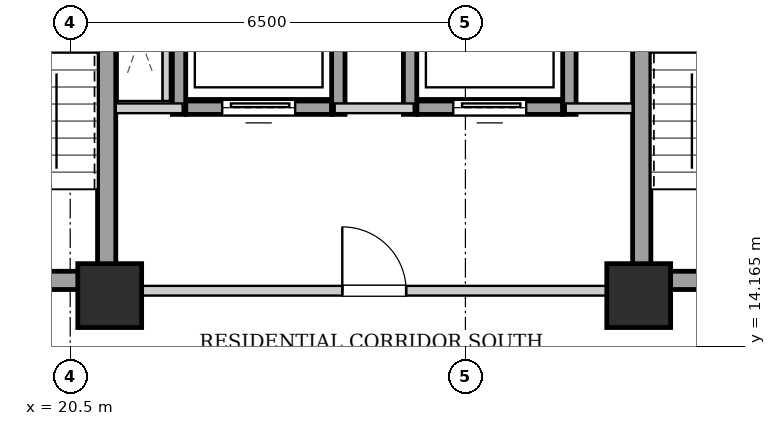
"""IFC4 building model, lengths in metres.
Left out: names, types, materials, properties, quantities, classifications, styles, units other than length and angle.
Written with IfcOpenShell. Run it as: python <this file> out.ifc"""

import sys

from ifc_helpers import new_model, si_unit, direction, frame, frame_2d, origin, origin_2d, place, context, subcontext, project, spatial, rectangle, extrude, element, fill, save


model = new_model("IFC4")
c1 = context("Model", 3, precision=1e-05, world=origin(), true_north=direction((0.0, 1.0)))
c2 = subcontext(c1, "Body", "Model", "MODEL_VIEW")
j1 = project(units=[si_unit("LENGTHUNIT", "METRE"), si_unit("PLANEANGLEUNIT", "RADIAN")], contexts=[c1])
p1 = place(None, origin())
s1 = spatial("IfcSite", under=j1, at=p1, CompositionType="ELEMENT")
p2 = place(p1, origin())
s2 = spatial("IfcBuilding", under=s1, at=p2, CompositionType="ELEMENT")
p3 = place(p2, frame((0.0, 0.0, 75.1)))
s3 = spatial("IfcBuildingStorey", under=s2, at=p3, CompositionType="ELEMENT", Elevation=75.1)
for number, where, z_axis, x_axis in (
    (1, (21.15, 15.0, 0.0), (0.0, 0.0, 1.0), (1.0, 0.0, 0.0)),
    (2, (29.85, 15.0, 0.0), (0.0, 0.0, 1.0), (1.0, 0.0, 0.0)),
):
    element("IfcColumn", number, at=place(p3, frame(where, z_axis=z_axis, x_axis=x_axis)), inside=s3, PredefinedType="COLUMN", context=c2, shape_type="SweptSolid", body=[
        extrude(rectangle(XDim=1.05, YDim=1.05, at=origin_2d()), origin(), (0.0, 0.0, 1.0), 3.2),
    ])
p4 = place(p3, frame((21.1, 15.1, 0.0), z_axis=(0.0, 0.0, 1.0), x_axis=(0.0, 1.0, 0.0)))
e3 = element("IfcWall", 3, at=p4, inside=s3, PredefinedType="SHEAR", context=c2, shape_type="SweptSolid", body=[
    extrude(rectangle(XDim=9.0, YDim=0.3, at=frame_2d((4.5, 0.0))), origin(), (0.0, 0.0, 1.0), 2.94),
])
p5 = place(p3, frame((18.1, 15.25, 0.0), z_axis=(0.0, 0.0, 1.0), x_axis=(1.0, 0.0, 0.0)))
e4 = element("IfcWall", 4, at=p5, inside=s3, PredefinedType="SHEAR", context=c2, shape_type="SweptSolid", body=[
    extrude(rectangle(XDim=2.85, YDim=0.3, at=frame_2d((1.425, 0.0))), origin(), (0.0, 0.0, 1.0), 2.94),
])
p6 = place(p5, frame((0.86, 0.0, 0.0)))
e5 = element("IfcOpeningElement", 5, at=p6, cuts=e4, PredefinedType="OPENING", context=c2, shape_type="SweptSolid", body=[
    extrude(rectangle(XDim=1.1, YDim=2.05, at=frame_2d((0.55, 1.025))), frame((0.0, 0.16, 0.0), z_axis=(0.0, -1.0, 0.0), x_axis=(1.0, 0.0, 0.0)), (0.0, 0.0, 1.0), 0.32),
])
p7 = place(p3, frame((29.9, 15.1, 0.0), z_axis=(0.0, 0.0, 1.0), x_axis=(0.0, 1.0, 0.0)))
e6 = element("IfcWall", 6, at=p7, inside=s3, PredefinedType="SHEAR", context=c2, shape_type="SweptSolid", body=[
    extrude(rectangle(XDim=9.0, YDim=0.3, at=frame_2d((4.5, 0.0))), origin(), (0.0, 0.0, 1.0), 2.94),
])
p8 = place(p3, frame((30.05, 15.25, 0.0), z_axis=(0.0, 0.0, 1.0), x_axis=(1.0, 0.0, 0.0)))
e7 = element("IfcWall", 7, at=p8, inside=s3, PredefinedType="SHEAR", context=c2, shape_type="SweptSolid", body=[
    extrude(rectangle(XDim=2.85, YDim=0.3, at=frame_2d((1.425, 0.0))), origin(), (0.0, 0.0, 1.0), 2.94),
])
p9 = place(p8, frame((0.86, 0.0, 0.0)))
e8 = element("IfcOpeningElement", 8, at=p9, cuts=e7, PredefinedType="OPENING", context=c2, shape_type="SweptSolid", body=[
    extrude(rectangle(XDim=1.1, YDim=2.05, at=frame_2d((0.55, 1.025))), frame((0.0, 0.16, 0.0), z_axis=(0.0, -1.0, 0.0), x_axis=(1.0, 0.0, 0.0)), (0.0, 0.0, 1.0), 0.32),
])
p10 = place(p3, frame((22.4, 18.09, 0.0), z_axis=(0.0, 0.0, 1.0), x_axis=(1.0, 0.0, 0.0)))
e9 = element("IfcWall", 9, at=p10, inside=s3, PredefinedType="SHEAR", context=c2, shape_type="SweptSolid", body=[
    extrude(rectangle(XDim=2.4, YDim=0.22, at=frame_2d((1.2, 0.0))), origin(), (0.0, 0.0, 1.0), 2.94),
])
p11 = place(p10, frame((0.6, 0.0, 0.0)))
e10 = element("IfcOpeningElement", 10, at=p11, cuts=e9, PredefinedType="OPENING", context=c2, shape_type="SweptSolid", body=[
    extrude(rectangle(XDim=1.2, YDim=2.15, at=frame_2d((0.6, 1.075))), frame((0.0, 0.12, 0.0), z_axis=(0.0, -1.0, 0.0), x_axis=(1.0, 0.0, 0.0)), (0.0, 0.0, 1.0), 0.24),
])
for number, where, z_axis, x_axis in (
    (11, (22.29, 17.98, 0.0), (0.0, 0.0, 1.0), (0.0, 1.0, 0.0)),
    (12, (24.91, 17.98, 0.0), (0.0, 0.0, 1.0), (0.0, 1.0, 0.0)),
):
    element("IfcWall", number, at=place(p3, frame(where, z_axis=z_axis, x_axis=x_axis)), inside=s3, PredefinedType="SHEAR", context=c2, shape_type="SweptSolid", body=[
        extrude(rectangle(XDim=2.54, YDim=0.22, at=frame_2d((1.27, 0.0))), origin(), (0.0, 0.0, 1.0), 2.94),
    ])
p12 = place(p3, frame((26.2, 18.09, 0.0), z_axis=(0.0, 0.0, 1.0), x_axis=(1.0, 0.0, 0.0)))
e13 = element("IfcWall", 13, at=p12, inside=s3, PredefinedType="SHEAR", context=c2, shape_type="SweptSolid", body=[
    extrude(rectangle(XDim=2.4, YDim=0.22, at=frame_2d((1.2, 0.0))), origin(), (0.0, 0.0, 1.0), 2.94),
])
p13 = place(p12, frame((0.6, 0.0, 0.0)))
e14 = element("IfcOpeningElement", 14, at=p13, cuts=e13, PredefinedType="OPENING", context=c2, shape_type="SweptSolid", body=[
    extrude(rectangle(XDim=1.2, YDim=2.15, at=frame_2d((0.6, 1.075))), frame((0.0, 0.12, 0.0), z_axis=(0.0, -1.0, 0.0), x_axis=(1.0, 0.0, 0.0)), (0.0, 0.0, 1.0), 0.24),
])
for number, where, z_axis, x_axis in (
    (15, (26.09, 17.98, 0.0), (0.0, 0.0, 1.0), (0.0, 1.0, 0.0)),
    (16, (28.71, 17.98, 0.0), (0.0, 0.0, 1.0), (0.0, 1.0, 0.0)),
):
    element("IfcWall", number, at=place(p3, frame(where, z_axis=z_axis, x_axis=x_axis)), inside=s3, PredefinedType="SHEAR", context=c2, shape_type="SweptSolid", body=[
        extrude(rectangle(XDim=2.54, YDim=0.22, at=frame_2d((1.27, 0.0))), origin(), (0.0, 0.0, 1.0), 2.94),
    ])
p14 = place(p3, frame((21.25, 15.08, 0.0), z_axis=(0.0, 0.0, 1.0), x_axis=(1.0, 0.0, 0.0)))
e17 = element("IfcWall", 17, at=p14, inside=s3, PredefinedType="PARTITIONING", context=c2, shape_type="SweptSolid", body=[
    extrude(rectangle(XDim=8.5, YDim=0.16, at=frame_2d((4.25, 0.0))), origin(), (0.0, 0.0, 1.0), 2.309),
])
p15 = place(p14, frame((3.725, 0.0, 0.0)))
e18 = element("IfcOpeningElement", 18, at=p15, cuts=e17, PredefinedType="OPENING", context=c2, shape_type="SweptSolid", body=[
    extrude(rectangle(XDim=1.05, YDim=2.05, at=frame_2d((0.525, 1.025))), frame((0.0, 0.09, 0.0), z_axis=(0.0, -1.0, 0.0), x_axis=(1.0, 0.0, 0.0)), (0.0, 0.0, 1.0), 0.18),
])
p16 = place(p3, frame((21.25, 18.08, 0.0), z_axis=(0.0, 0.0, 1.0), x_axis=(1.0, 0.0, 0.0)))
e19 = element("IfcWall", 19, at=p16, inside=s3, PredefinedType="PARTITIONING", context=c2, shape_type="SweptSolid", body=[
    extrude(rectangle(XDim=1.1, YDim=0.16, at=frame_2d((0.55, 0.0))), origin(), (0.0, 0.0, 1.0), 2.94),
])
p17 = place(p3, frame((24.85, 18.08, 0.0), z_axis=(0.0, 0.0, 1.0), x_axis=(1.0, 0.0, 0.0)))
e20 = element("IfcWall", 20, at=p17, inside=s3, PredefinedType="PARTITIONING", context=c2, shape_type="SweptSolid", body=[
    extrude(rectangle(XDim=1.3, YDim=0.16, at=frame_2d((0.65, 0.0))), origin(), (0.0, 0.0, 1.0), 2.94),
])
p18 = place(p3, frame((28.65, 18.08, 0.0), z_axis=(0.0, 0.0, 1.0), x_axis=(1.0, 0.0, 0.0)))
e21 = element("IfcWall", 21, at=p18, inside=s3, PredefinedType="PARTITIONING", context=c2, shape_type="SweptSolid", body=[
    extrude(rectangle(XDim=1.1, YDim=0.16, at=frame_2d((0.55, 0.0))), origin(), (0.0, 0.0, 1.0), 2.94),
])
p19 = place(p3, frame((22.08, 18.2, 0.0), z_axis=(0.0, 0.0, 1.0), x_axis=(0.0, 1.0, 0.0)))
e22 = element("IfcWall", 22, at=p19, inside=s3, PredefinedType="PARTITIONING", context=c2, shape_type="SweptSolid", body=[
    extrude(rectangle(XDim=2.12, YDim=0.12, at=frame_2d((1.06, 0.0))), origin(), (0.0, 0.0, 1.0), 2.94),
])
p20 = place(p11, origin())
e23 = element("IfcDoor", 23, at=p20, inside=s3, OperationType="SLIDING_TO_LEFT", PredefinedType="DOOR", context=c2, shape_type="SweptSolid", body=[
    extrude(rectangle(XDim=1.2, YDim=2.15, at=frame_2d((0.6, 1.075))), frame((0.0, 0.025, 0.0), z_axis=(0.0, -1.0, 0.0), x_axis=(1.0, 0.0, 0.0)), (0.0, 0.0, 1.0), 0.05),
])
fill(e10, e23)
p21 = place(p13, origin())
e24 = element("IfcDoor", 24, at=p21, inside=s3, OperationType="SLIDING_TO_LEFT", PredefinedType="DOOR", context=c2, shape_type="SweptSolid", body=[
    extrude(rectangle(XDim=1.2, YDim=2.15, at=frame_2d((0.6, 1.075))), frame((0.0, 0.025, 0.0), z_axis=(0.0, -1.0, 0.0), x_axis=(1.0, 0.0, 0.0)), (0.0, 0.0, 1.0), 0.05),
])
fill(e14, e24)
p22 = place(p15, origin())
e25 = element("IfcDoor", 25, at=p22, inside=s3, OperationType="SINGLE_SWING_LEFT", PredefinedType="DOOR", context=c2, shape_type="SweptSolid", body=[
    extrude(rectangle(XDim=1.05, YDim=2.05, at=frame_2d((0.525, 1.025))), frame((0.0, 0.025, 0.0), z_axis=(0.0, -1.0, 0.0), x_axis=(1.0, 0.0, 0.0)), (0.0, 0.0, 1.0), 0.05),
])
fill(e18, e25)
save(model, sys.argv[1])
